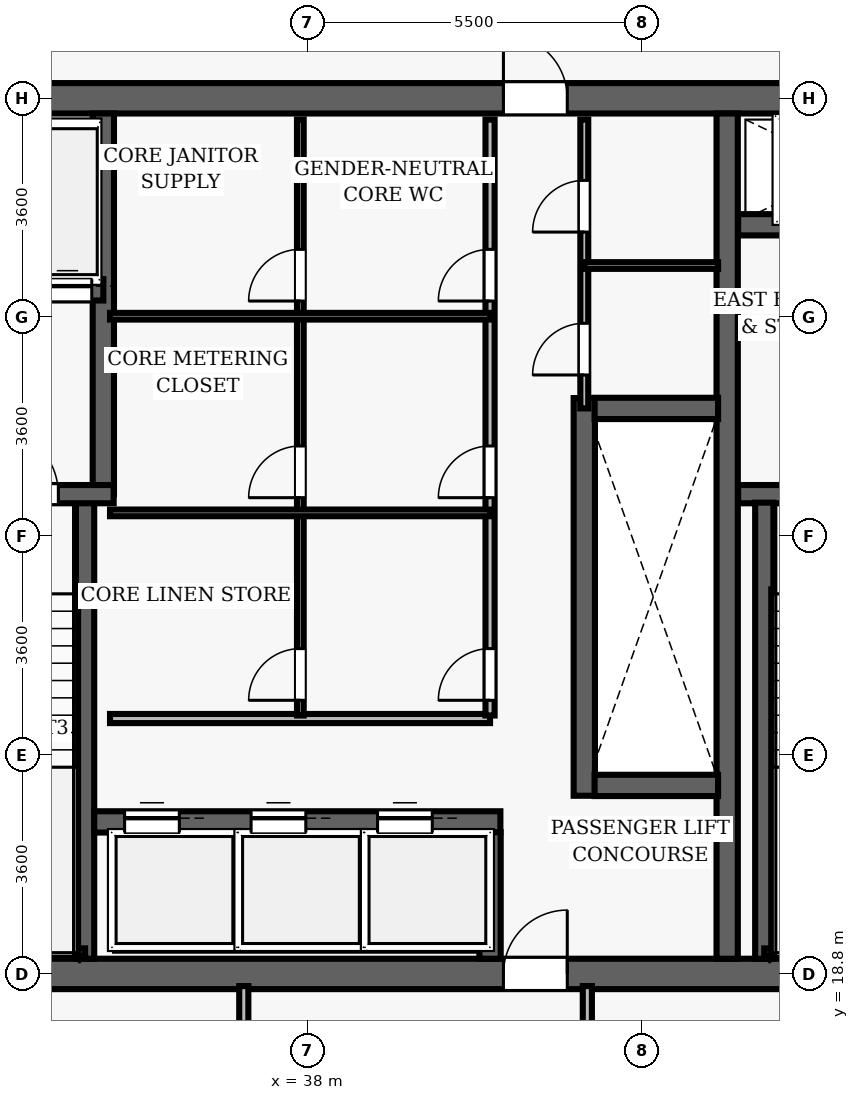
"""IFC4 building model, lengths in metres.
Left out: names, types, materials, properties, quantities, classifications, styles, units other than length and angle.
Written with IfcOpenShell. Run it as: python <this file> out.ifc"""

import sys

from ifc_helpers import new_model, si_unit, direction, frame, frame_2d, origin, place, context, subcontext, project, spatial, rectangle, extrude, element, fill, save


model = new_model("IFC4")
c1 = context("Model", 3, precision=1e-05, world=origin(), true_north=direction((0.0, 1.0)))
c2 = subcontext(c1, "Body", "Model", "MODEL_VIEW")
j1 = project(units=[si_unit("LENGTHUNIT", "METRE"), si_unit("PLANEANGLEUNIT", "RADIAN")], contexts=[c1])
p1 = place(None, origin())
s1 = spatial("IfcSite", under=j1, at=p1, CompositionType="ELEMENT")
p2 = place(p1, origin())
s2 = spatial("IfcBuilding", under=s1, at=p2, CompositionType="ELEMENT")
p3 = place(p2, frame((0.0, 0.0, 198.15)))
s3 = spatial("IfcBuildingStorey", under=s2, at=p3, CompositionType="ELEMENT", Elevation=198.15)
p4 = place(p3, frame((26.75, 18.8, 0.0), z_axis=(0.0, 0.0, 1.0), x_axis=(1.0, 0.0, 0.0)))
e1 = element("IfcWall", 1, at=p4, inside=s3, PredefinedType="SHEAR", context=c2, shape_type="SweptSolid", body=[
    extrude(rectangle(XDim=22.5, YDim=0.5, at=frame_2d((11.25, 0.0))), origin(), (0.0, 0.0, 1.0), 3.85),
])
p5 = place(p4, frame((14.47, 0.0, 0.0)))
e2 = element("IfcOpeningElement", 2, at=p5, cuts=e1, PredefinedType="OPENING", context=c2, shape_type="SweptSolid", body=[
    extrude(rectangle(XDim=1.05, YDim=2.15, at=frame_2d((0.525, 1.075))), frame((0.0, 0.26, 0.0), z_axis=(0.0, -1.0, 0.0), x_axis=(1.0, 0.0, 0.0)), (0.0, 0.0, 1.0), 0.52),
])
p6 = place(p3, frame((26.75, 33.2, 0.0), z_axis=(0.0, 0.0, 1.0), x_axis=(1.0, 0.0, 0.0)))
e3 = element("IfcWall", 3, at=p6, inside=s3, PredefinedType="SHEAR", context=c2, shape_type="SweptSolid", body=[
    extrude(rectangle(XDim=22.5, YDim=0.5, at=frame_2d((11.25, 0.0))), origin(), (0.0, 0.0, 1.0), 3.85),
])
p7 = place(p6, frame((4.57, 0.0, 0.0)))
e4 = element("IfcOpeningElement", 4, at=p7, cuts=e3, PredefinedType="OPENING", context=c2, shape_type="SweptSolid", body=[
    extrude(rectangle(XDim=1.05, YDim=2.15, at=frame_2d((0.525, 1.075))), frame((0.0, 0.26, 0.0), z_axis=(0.0, -1.0, 0.0), x_axis=(1.0, 0.0, 0.0)), (0.0, 0.0, 1.0), 0.52),
])
p8 = place(p6, frame((14.47, 0.0, 0.0)))
e5 = element("IfcOpeningElement", 5, at=p8, cuts=e3, PredefinedType="OPENING", context=c2, shape_type="SweptSolid", body=[
    extrude(rectangle(XDim=1.05, YDim=2.15, at=frame_2d((0.525, 1.075))), frame((0.0, 0.26, 0.0), z_axis=(0.0, -1.0, 0.0), x_axis=(1.0, 0.0, 0.0)), (0.0, 0.0, 1.0), 0.52),
])
p9 = place(p3, frame((44.9, 19.05, 0.0), z_axis=(0.0, 0.0, 1.0), x_axis=(0.0, 1.0, 0.0)))
e6 = element("IfcWall", 6, at=p9, inside=s3, PredefinedType="SHEAR", context=c2, shape_type="SweptSolid", body=[
    extrude(rectangle(XDim=13.9, YDim=0.35, at=frame_2d((6.95, 0.0))), origin(), (0.0, 0.0, 1.0), 3.85),
])
p10 = place(p3, frame((45.08, 26.69, 0.0), z_axis=(0.0, 0.0, 1.0), x_axis=(1.0, 0.0, 0.0)))
e7 = element("IfcWall", 7, at=p10, inside=s3, PredefinedType="SHEAR", context=c2, shape_type="SweptSolid", body=[
    extrude(rectangle(XDim=3.67, YDim=0.3, at=frame_2d((1.835, 0.0))), origin(), (0.0, 0.0, 1.0), 3.85),
])
p11 = place(p10, frame((1.05, 0.0, 0.0)))
e8 = element("IfcOpeningElement", 8, at=p11, cuts=e7, PredefinedType="OPENING", context=c2, shape_type="SweptSolid", body=[
    extrude(rectangle(XDim=1.1, YDim=2.15, at=frame_2d((0.55, 1.075))), frame((0.0, 0.16, 0.0), z_axis=(0.0, -1.0, 0.0), x_axis=(1.0, 0.0, 0.0)), (0.0, 0.0, 1.0), 0.32),
])
p12 = place(p3, frame((45.51, 19.05, 0.0), z_axis=(0.0, 0.0, 1.0), x_axis=(0.0, 1.0, 0.0)))
e9 = element("IfcWall", 9, at=p12, inside=s3, PredefinedType="SHEAR", context=c2, shape_type="SweptSolid", body=[
    extrude(rectangle(XDim=7.5, YDim=0.3, at=frame_2d((3.75, 0.0))), origin(), (0.0, 0.0, 1.0), 3.85),
])
p13 = place(p3, frame((45.51, 19.16, 0.0), z_axis=(0.0, 0.0, 1.0), x_axis=(1.0, 0.0, 0.0)))
e10 = element("IfcWall", 10, at=p13, inside=s3, PredefinedType="SHEAR", context=c2, shape_type="SweptSolid", body=[
    extrude(rectangle(XDim=3.095, YDim=0.12, at=frame_2d((1.547, 0.0))), origin(), (0.0, 0.0, 1.0), 3.85),
])
p14 = place(p3, frame((45.08, 31.12, 0.0), z_axis=(0.0, 0.0, 1.0), x_axis=(1.0, 0.0, 0.0)))
e11 = element("IfcWall", 11, at=p14, inside=s3, PredefinedType="SHEAR", context=c2, shape_type="SweptSolid", body=[
    extrude(rectangle(XDim=3.67, YDim=0.35, at=frame_2d((1.835, 0.0))), origin(), (0.0, 0.0, 1.0), 3.035),
])
p15 = place(p14, frame((1.25, 0.0, 0.0)))
e12 = element("IfcOpeningElement", 12, at=p15, cuts=e11, PredefinedType="OPENING", context=c2, shape_type="SweptSolid", body=[
    extrude(rectangle(XDim=1.1, YDim=2.15, at=frame_2d((0.55, 1.075))), frame((0.0, 0.185, 0.0), z_axis=(0.0, -1.0, 0.0), x_axis=(1.0, 0.0, 0.0)), (0.0, 0.0, 1.0), 0.37),
])
p16 = place(p3, frame((34.34, 19.05, 0.0), z_axis=(0.0, 0.0, 1.0), x_axis=(0.0, 1.0, 0.0)))
e13 = element("IfcWall", 13, at=p16, inside=s3, PredefinedType="SHEAR", context=c2, shape_type="SweptSolid", body=[
    extrude(rectangle(XDim=7.5, YDim=0.3, at=frame_2d((3.75, 0.0))), origin(), (0.0, 0.0, 1.0), 3.85),
])
p17 = place(p3, frame((34.64, 26.69, 0.0), z_axis=(0.0, 0.0, 1.0), x_axis=(0.0, 1.0, 0.0)))
e14 = element("IfcWall", 14, at=p17, inside=s3, PredefinedType="SHEAR", context=c2, shape_type="SweptSolid", body=[
    extrude(rectangle(XDim=6.26, YDim=0.35, at=frame_2d((3.13, 0.0))), origin(), (0.0, 0.0, 1.0), 3.85),
])
p18 = place(p3, frame((31.25, 26.69, 0.0), z_axis=(0.0, 0.0, 1.0), x_axis=(1.0, 0.0, 0.0)))
e15 = element("IfcWall", 15, at=p18, inside=s3, PredefinedType="SHEAR", context=c2, shape_type="SweptSolid", body=[
    extrude(rectangle(XDim=3.56, YDim=0.3, at=frame_2d((1.78, 0.0))), origin(), (0.0, 0.0, 1.0), 3.85),
])
p19 = place(p18, frame((1.55, 0.0, 0.0)))
e16 = element("IfcOpeningElement", 16, at=p19, cuts=e15, PredefinedType="OPENING", context=c2, shape_type="SweptSolid", body=[
    extrude(rectangle(XDim=1.1, YDim=2.15, at=frame_2d((0.55, 1.075))), frame((0.0, 0.16, 0.0), z_axis=(0.0, -1.0, 0.0), x_axis=(1.0, 0.0, 0.0)), (0.0, 0.0, 1.0), 0.32),
])
p20 = place(p3, frame((31.3, 19.16, 0.0), z_axis=(0.0, 0.0, 1.0), x_axis=(1.0, 0.0, 0.0)))
e17 = element("IfcWall", 17, at=p20, inside=s3, PredefinedType="SHEAR", context=c2, shape_type="SweptSolid", body=[
    extrude(rectangle(XDim=3.04, YDim=0.12, at=frame_2d((1.52, 0.0))), origin(), (0.0, 0.0, 1.0), 3.85),
])
p21 = place(p3, frame((32.23, 30.05, 0.0), z_axis=(0.0, 0.0, 1.0), x_axis=(1.0, 0.0, 0.0)))
e18 = element("IfcWall", 18, at=p21, inside=s3, PredefinedType="SHEAR", context=c2, shape_type="SweptSolid", body=[
    extrude(rectangle(XDim=2.41, YDim=0.35, at=frame_2d((1.205, 0.0))), origin(), (0.0, 0.0, 1.0), 3.035),
])
p22 = place(p21, frame((0.42, 0.0, 0.0)))
e19 = element("IfcOpeningElement", 19, at=p22, cuts=e18, PredefinedType="OPENING", context=c2, shape_type="SweptSolid", body=[
    extrude(rectangle(XDim=0.8, YDim=2.15, at=frame_2d((0.4, 1.075))), frame((0.0, 0.185, 0.0), z_axis=(0.0, -1.0, 0.0), x_axis=(1.0, 0.0, 0.0)), (0.0, 0.0, 1.0), 0.37),
])
p23 = place(p21, frame((1.42, 0.0, 0.0)))
e20 = element("IfcOpeningElement", 20, at=p23, cuts=e18, PredefinedType="OPENING", context=c2, shape_type="SweptSolid", body=[
    extrude(rectangle(XDim=0.8, YDim=2.15, at=frame_2d((0.4, 1.075))), frame((0.0, 0.185, 0.0), z_axis=(0.0, -1.0, 0.0), x_axis=(1.0, 0.0, 0.0)), (0.0, 0.0, 1.0), 0.37),
])
p24 = place(p3, frame((42.55, 21.73, 0.0), z_axis=(0.0, 0.0, 1.0), x_axis=(0.0, 1.0, 0.0)))
e21 = element("IfcWall", 21, at=p24, inside=s3, PredefinedType="SHEAR", context=c2, shape_type="SweptSolid", body=[
    extrude(rectangle(XDim=6.54, YDim=0.35, at=frame_2d((3.27, 0.0))), origin(), (0.0, 0.0, 1.0), 3.035),
])
for number, where, z_axis, x_axis in (
    (22, (42.72, 21.9, 0.0), (0.0, 0.0, 1.0), (1.0, 0.0, 0.0)),
    (23, (42.72, 28.1, 0.0), (0.0, 0.0, 1.0), (1.0, 0.0, 0.0)),
):
    element("IfcWall", number, at=place(p3, frame(where, z_axis=z_axis, x_axis=x_axis)), inside=s3, PredefinedType="SHEAR", context=c2, shape_type="SweptSolid", body=[
        extrude(rectangle(XDim=2.03, YDim=0.35, at=frame_2d((1.015, 0.0))), origin(), (0.0, 0.0, 1.0), 3.035),
    ])
p25 = place(p3, frame((34.49, 21.3, 0.0), z_axis=(0.0, 0.0, 1.0), x_axis=(1.0, 0.0, 0.0)))
e24 = element("IfcWall", 24, at=p25, inside=s3, PredefinedType="SHEAR", context=c2, shape_type="SweptSolid", body=[
    extrude(rectangle(XDim=6.68, YDim=0.35, at=frame_2d((3.34, 0.0))), origin(), (0.0, 0.0, 1.0), 3.035),
])
p26 = place(p25, frame((0.5, 0.0, 0.0)))
e25 = element("IfcOpeningElement", 25, at=p26, cuts=e24, PredefinedType="OPENING", context=c2, shape_type="SweptSolid", body=[
    extrude(rectangle(XDim=0.9, YDim=2.15, at=frame_2d((0.45, 1.075))), frame((0.0, 0.185, 0.0), z_axis=(0.0, -1.0, 0.0), x_axis=(1.0, 0.0, 0.0)), (0.0, 0.0, 1.0), 0.37),
])
p27 = place(p25, frame((2.58, 0.0, 0.0)))
e26 = element("IfcOpeningElement", 26, at=p27, cuts=e24, PredefinedType="OPENING", context=c2, shape_type="SweptSolid", body=[
    extrude(rectangle(XDim=0.9, YDim=2.15, at=frame_2d((0.45, 1.075))), frame((0.0, 0.185, 0.0), z_axis=(0.0, -1.0, 0.0), x_axis=(1.0, 0.0, 0.0)), (0.0, 0.0, 1.0), 0.37),
])
p28 = place(p25, frame((4.66, 0.0, 0.0)))
e27 = element("IfcOpeningElement", 27, at=p28, cuts=e24, PredefinedType="OPENING", context=c2, shape_type="SweptSolid", body=[
    extrude(rectangle(XDim=0.9, YDim=2.15, at=frame_2d((0.45, 1.075))), frame((0.0, 0.185, 0.0), z_axis=(0.0, -1.0, 0.0), x_axis=(1.0, 0.0, 0.0)), (0.0, 0.0, 1.0), 0.37),
])
p29 = place(p3, frame((41.0, 19.05, 0.0), z_axis=(0.0, 0.0, 1.0), x_axis=(0.0, 1.0, 0.0)))
e28 = element("IfcWall", 28, at=p29, inside=s3, PredefinedType="SHEAR", context=c2, shape_type="SweptSolid", body=[
    extrude(rectangle(XDim=2.08, YDim=0.35, at=frame_2d((1.04, 0.0))), origin(), (0.0, 0.0, 1.0), 3.035),
])
p30 = place(p3, frame((34.75, 23.0, 0.0), z_axis=(0.0, 0.0, 1.0), x_axis=(1.0, 0.0, 0.0)))
e29 = element("IfcWall", 29, at=p30, inside=s3, PredefinedType="PARTITIONING", context=c2, shape_type="SweptSolid", body=[
    extrude(rectangle(XDim=6.25, YDim=0.15, at=frame_2d((3.125, 0.0))), origin(), (0.0, 0.0, 1.0), 3.035),
])
p31 = place(p3, frame((41.0, 23.05, 0.0), z_axis=(0.0, 0.0, 1.0), x_axis=(0.0, 1.0, 0.0)))
e30 = element("IfcWall", 30, at=p31, inside=s3, PredefinedType="PARTITIONING", context=c2, shape_type="SweptSolid", body=[
    extrude(rectangle(XDim=9.8, YDim=0.15, at=frame_2d((4.9, 0.0))), origin(), (0.0, 0.0, 1.0), 3.035),
])
p32 = place(p31, frame((0.25, 0.0, 0.0)))
e31 = element("IfcOpeningElement", 31, at=p32, cuts=e30, PredefinedType="OPENING", context=c2, shape_type="SweptSolid", body=[
    extrude(rectangle(XDim=0.85, YDim=2.1, at=frame_2d((0.425, 1.05))), frame((0.0, 0.085, 0.0), z_axis=(0.0, -1.0, 0.0), x_axis=(1.0, 0.0, 0.0)), (0.0, 0.0, 1.0), 0.17),
])
p33 = place(p31, frame((3.582, 0.0, 0.0)))
e32 = element("IfcOpeningElement", 32, at=p33, cuts=e30, PredefinedType="OPENING", context=c2, shape_type="SweptSolid", body=[
    extrude(rectangle(XDim=0.85, YDim=2.1, at=frame_2d((0.425, 1.05))), frame((0.0, 0.085, 0.0), z_axis=(0.0, -1.0, 0.0), x_axis=(1.0, 0.0, 0.0)), (0.0, 0.0, 1.0), 0.17),
])
p34 = place(p31, frame((6.816, 0.0, 0.0)))
e33 = element("IfcOpeningElement", 33, at=p34, cuts=e30, PredefinedType="OPENING", context=c2, shape_type="SweptSolid", body=[
    extrude(rectangle(XDim=0.85, YDim=2.1, at=frame_2d((0.425, 1.05))), frame((0.0, 0.085, 0.0), z_axis=(0.0, -1.0, 0.0), x_axis=(1.0, 0.0, 0.0)), (0.0, 0.0, 1.0), 0.17),
])
p35 = place(p3, frame((37.88, 23.05, 0.0), z_axis=(0.0, 0.0, 1.0), x_axis=(0.0, 1.0, 0.0)))
e34 = element("IfcWall", 34, at=p35, inside=s3, PredefinedType="PARTITIONING", context=c2, shape_type="SweptSolid", body=[
    extrude(rectangle(XDim=9.8, YDim=0.11, at=frame_2d((4.9, 0.0))), origin(), (0.0, 0.0, 1.0), 3.035),
])
p36 = place(p35, frame((0.25, 0.0, 0.0)))
e35 = element("IfcOpeningElement", 35, at=p36, cuts=e34, PredefinedType="OPENING", context=c2, shape_type="SweptSolid", body=[
    extrude(rectangle(XDim=0.85, YDim=2.1, at=frame_2d((0.425, 1.05))), frame((0.0, 0.065, 0.0), z_axis=(0.0, -1.0, 0.0), x_axis=(1.0, 0.0, 0.0)), (0.0, 0.0, 1.0), 0.13),
])
p37 = place(p35, frame((3.582, 0.0, 0.0)))
e36 = element("IfcOpeningElement", 36, at=p37, cuts=e34, PredefinedType="OPENING", context=c2, shape_type="SweptSolid", body=[
    extrude(rectangle(XDim=0.85, YDim=2.1, at=frame_2d((0.425, 1.05))), frame((0.0, 0.065, 0.0), z_axis=(0.0, -1.0, 0.0), x_axis=(1.0, 0.0, 0.0)), (0.0, 0.0, 1.0), 0.13),
])
p38 = place(p35, frame((6.816, 0.0, 0.0)))
e37 = element("IfcOpeningElement", 37, at=p38, cuts=e34, PredefinedType="OPENING", context=c2, shape_type="SweptSolid", body=[
    extrude(rectangle(XDim=0.85, YDim=2.1, at=frame_2d((0.425, 1.05))), frame((0.0, 0.065, 0.0), z_axis=(0.0, -1.0, 0.0), x_axis=(1.0, 0.0, 0.0)), (0.0, 0.0, 1.0), 0.13),
])
for number, where, z_axis, x_axis in (
    (38, (34.75, 26.382, 0.0), (0.0, 0.0, 1.0), (1.0, 0.0, 0.0)),
    (39, (34.75, 29.616, 0.0), (0.0, 0.0, 1.0), (1.0, 0.0, 0.0)),
):
    element("IfcWall", number, at=place(p3, frame(where, z_axis=z_axis, x_axis=x_axis)), inside=s3, PredefinedType="PARTITIONING", context=c2, shape_type="SweptSolid", body=[
        extrude(rectangle(XDim=6.25, YDim=0.11, at=frame_2d((3.125, 0.0))), origin(), (0.0, 0.0, 1.0), 3.035),
    ])
p39 = place(p3, frame((42.55, 28.1, 0.0), z_axis=(0.0, 0.0, 1.0), x_axis=(0.0, 1.0, 0.0)))
e40 = element("IfcWall", 40, at=p39, inside=s3, PredefinedType="PARTITIONING", context=c2, shape_type="SweptSolid", body=[
    extrude(rectangle(XDim=4.75, YDim=0.13, at=frame_2d((2.375, 0.0))), origin(), (0.0, 0.0, 1.0), 3.035),
])
p40 = place(p39, frame((0.55, 0.0, 0.0)))
e41 = element("IfcOpeningElement", 41, at=p40, cuts=e40, PredefinedType="OPENING", context=c2, shape_type="SweptSolid", body=[
    extrude(rectangle(XDim=0.85, YDim=2.1, at=frame_2d((0.425, 1.05))), frame((0.0, 0.075, 0.0), z_axis=(0.0, -1.0, 0.0), x_axis=(1.0, 0.0, 0.0)), (0.0, 0.0, 1.0), 0.15),
])
p41 = place(p39, frame((2.9, 0.0, 0.0)))
e42 = element("IfcOpeningElement", 42, at=p41, cuts=e40, PredefinedType="OPENING", context=c2, shape_type="SweptSolid", body=[
    extrude(rectangle(XDim=0.85, YDim=2.1, at=frame_2d((0.425, 1.05))), frame((0.0, 0.075, 0.0), z_axis=(0.0, -1.0, 0.0), x_axis=(1.0, 0.0, 0.0)), (0.0, 0.0, 1.0), 0.15),
])
p42 = place(p3, frame((42.55, 30.45, 0.0), z_axis=(0.0, 0.0, 1.0), x_axis=(1.0, 0.0, 0.0)))
e43 = element("IfcWall", 43, at=p42, inside=s3, PredefinedType="PARTITIONING", context=c2, shape_type="SweptSolid", body=[
    extrude(rectangle(XDim=2.2, YDim=0.11, at=frame_2d((1.1, 0.0))), origin(), (0.0, 0.0, 1.0), 3.035),
])
p43 = place(p3, frame((36.95, 11.2, 0.0), z_axis=(0.0, 0.0, 1.0), x_axis=(0.0, 1.0, 0.0)))
e44 = element("IfcWall", 44, at=p43, inside=s3, PredefinedType="PARTITIONING", context=c2, shape_type="SweptSolid", body=[
    extrude(rectangle(XDim=7.4, YDim=0.15, at=frame_2d((3.7, 0.0))), origin(), (0.0, 0.0, 1.0), 3.035),
])
p44 = place(p43, frame((5.075, 0.0, 0.0)))
e45 = element("IfcOpeningElement", 45, at=p44, cuts=e44, PredefinedType="OPENING", context=c2, shape_type="SweptSolid", body=[
    extrude(rectangle(XDim=0.95, YDim=2.15, at=frame_2d((0.475, 1.075))), frame((0.0, 0.085, 0.0), z_axis=(0.0, -1.0, 0.0), x_axis=(1.0, 0.0, 0.0)), (0.0, 0.0, 1.0), 0.17),
])
p45 = place(p3, frame((42.6, 16.65, 0.0), z_axis=(0.0, 0.0, 1.0), x_axis=(0.0, 1.0, 0.0)))
e46 = element("IfcWall", 46, at=p45, inside=s3, PredefinedType="PARTITIONING", context=c2, shape_type="SweptSolid", body=[
    extrude(rectangle(XDim=1.95, YDim=0.15, at=frame_2d((0.975, 0.0))), origin(), (0.0, 0.0, 1.0), 3.035),
])
p46 = place(p19, origin())
e47 = element("IfcDoor", 47, at=p46, inside=s3, OperationType="SINGLE_SWING_LEFT", PredefinedType="DOOR", context=c2, shape_type="SweptSolid", body=[
    extrude(rectangle(XDim=1.1, YDim=2.15, at=frame_2d((0.55, 1.075))), frame((0.0, 0.025, 0.0), z_axis=(0.0, -1.0, 0.0), x_axis=(1.0, 0.0, 0.0)), (0.0, 0.0, 1.0), 0.05),
])
fill(e16, e47)
p47 = place(p8, origin())
e48 = element("IfcDoor", 48, at=p47, inside=s3, OperationType="SINGLE_SWING_LEFT", PredefinedType="DOOR", context=c2, shape_type="SweptSolid", body=[
    extrude(rectangle(XDim=1.05, YDim=2.15, at=frame_2d((0.525, 1.075))), frame((0.0, 0.025, 0.0), z_axis=(0.0, -1.0, 0.0), x_axis=(1.0, 0.0, 0.0)), (0.0, 0.0, 1.0), 0.05),
])
fill(e5, e48)
p48 = place(p5, origin())
e49 = element("IfcDoor", 49, at=p48, inside=s3, OperationType="SINGLE_SWING_RIGHT", PredefinedType="DOOR", context=c2, shape_type="SweptSolid", body=[
    extrude(rectangle(XDim=1.05, YDim=2.15, at=frame_2d((0.525, 1.075))), frame((0.0, 0.025, 0.0), z_axis=(0.0, -1.0, 0.0), x_axis=(1.0, 0.0, 0.0)), (0.0, 0.0, 1.0), 0.05),
])
fill(e2, e49)
p49 = place(p32, origin())
e50 = element("IfcDoor", 50, at=p49, inside=s3, OperationType="SINGLE_SWING_LEFT", PredefinedType="DOOR", context=c2, shape_type="SweptSolid", body=[
    extrude(rectangle(XDim=0.85, YDim=2.1, at=frame_2d((0.425, 1.05))), frame((0.0, 0.025, 0.0), z_axis=(0.0, -1.0, 0.0), x_axis=(1.0, 0.0, 0.0)), (0.0, 0.0, 1.0), 0.05),
])
fill(e31, e50)
p50 = place(p36, origin())
e51 = element("IfcDoor", 51, at=p50, inside=s3, OperationType="SINGLE_SWING_LEFT", PredefinedType="DOOR", context=c2, shape_type="SweptSolid", body=[
    extrude(rectangle(XDim=0.85, YDim=2.1, at=frame_2d((0.425, 1.05))), frame((0.0, 0.025, 0.0), z_axis=(0.0, -1.0, 0.0), x_axis=(1.0, 0.0, 0.0)), (0.0, 0.0, 1.0), 0.05),
])
fill(e35, e51)
p51 = place(p33, origin())
e52 = element("IfcDoor", 52, at=p51, inside=s3, OperationType="SINGLE_SWING_LEFT", PredefinedType="DOOR", context=c2, shape_type="SweptSolid", body=[
    extrude(rectangle(XDim=0.85, YDim=2.1, at=frame_2d((0.425, 1.05))), frame((0.0, 0.025, 0.0), z_axis=(0.0, -1.0, 0.0), x_axis=(1.0, 0.0, 0.0)), (0.0, 0.0, 1.0), 0.05),
])
fill(e32, e52)
p52 = place(p37, origin())
e53 = element("IfcDoor", 53, at=p52, inside=s3, OperationType="SINGLE_SWING_LEFT", PredefinedType="DOOR", context=c2, shape_type="SweptSolid", body=[
    extrude(rectangle(XDim=0.85, YDim=2.1, at=frame_2d((0.425, 1.05))), frame((0.0, 0.025, 0.0), z_axis=(0.0, -1.0, 0.0), x_axis=(1.0, 0.0, 0.0)), (0.0, 0.0, 1.0), 0.05),
])
fill(e36, e53)
p53 = place(p34, origin())
e54 = element("IfcDoor", 54, at=p53, inside=s3, OperationType="SINGLE_SWING_LEFT", PredefinedType="DOOR", context=c2, shape_type="SweptSolid", body=[
    extrude(rectangle(XDim=0.85, YDim=2.1, at=frame_2d((0.425, 1.05))), frame((0.0, 0.025, 0.0), z_axis=(0.0, -1.0, 0.0), x_axis=(1.0, 0.0, 0.0)), (0.0, 0.0, 1.0), 0.05),
])
fill(e33, e54)
p54 = place(p38, origin())
e55 = element("IfcDoor", 55, at=p54, inside=s3, OperationType="SINGLE_SWING_LEFT", PredefinedType="DOOR", context=c2, shape_type="SweptSolid", body=[
    extrude(rectangle(XDim=0.85, YDim=2.1, at=frame_2d((0.425, 1.05))), frame((0.0, 0.025, 0.0), z_axis=(0.0, -1.0, 0.0), x_axis=(1.0, 0.0, 0.0)), (0.0, 0.0, 1.0), 0.05),
])
fill(e37, e55)
p55 = place(p40, origin())
e56 = element("IfcDoor", 56, at=p55, inside=s3, OperationType="SINGLE_SWING_LEFT", PredefinedType="DOOR", context=c2, shape_type="SweptSolid", body=[
    extrude(rectangle(XDim=0.85, YDim=2.1, at=frame_2d((0.425, 1.05))), frame((0.0, 0.025, 0.0), z_axis=(0.0, -1.0, 0.0), x_axis=(1.0, 0.0, 0.0)), (0.0, 0.0, 1.0), 0.05),
])
fill(e41, e56)
p56 = place(p41, origin())
e57 = element("IfcDoor", 57, at=p56, inside=s3, OperationType="SINGLE_SWING_LEFT", PredefinedType="DOOR", context=c2, shape_type="SweptSolid", body=[
    extrude(rectangle(XDim=0.85, YDim=2.1, at=frame_2d((0.425, 1.05))), frame((0.0, 0.025, 0.0), z_axis=(0.0, -1.0, 0.0), x_axis=(1.0, 0.0, 0.0)), (0.0, 0.0, 1.0), 0.05),
])
fill(e42, e57)
p57 = place(p26, origin())
e58 = element("IfcDoor", 58, at=p57, inside=s3, OperationType="SLIDING_TO_LEFT", PredefinedType="DOOR", context=c2, shape_type="SweptSolid", body=[
    extrude(rectangle(XDim=0.9, YDim=2.15, at=frame_2d((0.45, 1.075))), frame((0.0, 0.025, 0.0), z_axis=(0.0, -1.0, 0.0), x_axis=(1.0, 0.0, 0.0)), (0.0, 0.0, 1.0), 0.05),
])
fill(e25, e58)
p58 = place(p27, origin())
e59 = element("IfcDoor", 59, at=p58, inside=s3, OperationType="SLIDING_TO_LEFT", PredefinedType="DOOR", context=c2, shape_type="SweptSolid", body=[
    extrude(rectangle(XDim=0.9, YDim=2.15, at=frame_2d((0.45, 1.075))), frame((0.0, 0.025, 0.0), z_axis=(0.0, -1.0, 0.0), x_axis=(1.0, 0.0, 0.0)), (0.0, 0.0, 1.0), 0.05),
])
fill(e26, e59)
p59 = place(p28, origin())
e60 = element("IfcDoor", 60, at=p59, inside=s3, OperationType="SLIDING_TO_LEFT", PredefinedType="DOOR", context=c2, shape_type="SweptSolid", body=[
    extrude(rectangle(XDim=0.9, YDim=2.15, at=frame_2d((0.45, 1.075))), frame((0.0, 0.025, 0.0), z_axis=(0.0, -1.0, 0.0), x_axis=(1.0, 0.0, 0.0)), (0.0, 0.0, 1.0), 0.05),
])
fill(e27, e60)
p60 = place(p23, origin())
e61 = element("IfcDoor", 61, at=p60, inside=s3, OperationType="SLIDING_TO_LEFT", PredefinedType="DOOR", context=c2, shape_type="SweptSolid", body=[
    extrude(rectangle(XDim=0.8, YDim=2.15, at=frame_2d((0.4, 1.075))), frame((0.0, 0.025, 0.0), z_axis=(0.0, -1.0, 0.0), x_axis=(1.0, 0.0, 0.0)), (0.0, 0.0, 1.0), 0.05),
])
fill(e20, e61)
save(model, sys.argv[1])
